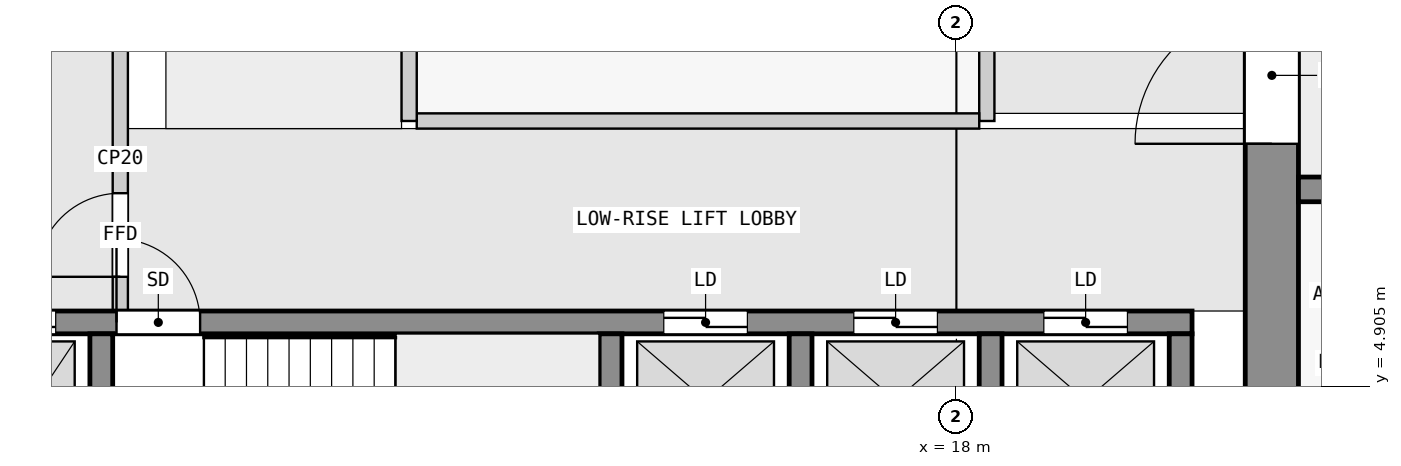
"""IFC4 building model, lengths in metres.
Left out: names, types, materials, properties, quantities, classifications, styles, units other than length and angle.
Written with IfcOpenShell. Run it as: python <this file> out.ifc"""

import sys

from ifc_helpers import new_model, si_unit, direction, frame, frame_2d, origin, place, context, subcontext, project, spatial, rectangle, extrude, element, fill, save


model = new_model("IFC4")
c1 = context("Model", 3, precision=1e-05, world=origin(), true_north=direction((0.0, 1.0)))
c2 = subcontext(c1, "Body", "Model", "MODEL_VIEW")
j1 = project(units=[si_unit("LENGTHUNIT", "METRE"), si_unit("PLANEANGLEUNIT", "RADIAN")], contexts=[c1])
p1 = place(None, origin())
s1 = spatial("IfcSite", under=j1, at=p1, CompositionType="ELEMENT")
p2 = place(p1, origin())
s2 = spatial("IfcBuilding", under=s1, at=p2, CompositionType="ELEMENT")
p3 = place(p2, frame((0.0, 0.0, 92.3)))
s3 = spatial("IfcBuildingStorey", under=s2, at=p3, CompositionType="ELEMENT", Elevation=92.3)
p4 = place(p3, frame((22.15, 2.5, 0.0), z_axis=(0.0, 0.0, 1.0), x_axis=(0.0, 1.0, 0.0)))
e1 = element("IfcWall", 1, at=p4, inside=s3, PredefinedType="SHEAR", context=c2, shape_type="SweptSolid", body=[
    extrude(rectangle(XDim=14.8, YDim=0.7, at=frame_2d((7.4, 0.0))), origin(), (0.0, 0.0, 1.0), 3.25),
])
p5 = place(p4, frame((5.6, 0.0, 0.0)))
e2 = element("IfcOpeningElement", 2, at=p5, cuts=e1, PredefinedType="OPENING", context=c2, shape_type="SweptSolid", body=[
    extrude(rectangle(XDim=1.8, YDim=2.1, at=frame_2d((0.9, 1.05))), frame((0.0, 0.36, 0.0), z_axis=(0.0, -1.0, 0.0), x_axis=(1.0, 0.0, 0.0)), (0.0, 0.0, 1.0), 0.72),
])
for number, where, z_axis, x_axis in (
    (3, (6.75, 2.8, 0.0), (0.0, 0.0, 1.0), (0.0, 1.0, 0.0)),
    (4, (13.45, 2.8, 0.0), (0.0, 0.0, 1.0), (0.0, 1.0, 0.0)),
    (5, (15.95, 2.8, 0.0), (0.0, 0.0, 1.0), (0.0, 1.0, 0.0)),
    (6, (18.45, 2.8, 0.0), (0.0, 0.0, 1.0), (0.0, 1.0, 0.0)),
    (7, (20.95, 2.8, 0.0), (0.0, 0.0, 1.0), (0.0, 1.0, 0.0)),
):
    element("IfcWall", number, at=place(p3, frame(where, z_axis=z_axis, x_axis=x_axis)), inside=s3, PredefinedType="SHEAR", context=c2, shape_type="SweptSolid", body=[
        extrude(rectangle(XDim=2.8, YDim=0.3, at=frame_2d((1.4, 0.0))), origin(), (0.0, 0.0, 1.0), 3.25),
    ])
p6 = place(p3, frame((2.3, 5.75, 0.0), z_axis=(0.0, 0.0, 1.0), x_axis=(1.0, 0.0, 0.0)))
e8 = element("IfcWall", 8, at=p6, inside=s3, PredefinedType="SHEAR", context=c2, shape_type="SweptSolid", body=[
    extrude(rectangle(XDim=18.8, YDim=0.3, at=frame_2d((9.4, 0.0))), origin(), (0.0, 0.0, 1.0), 3.25),
])
p7 = place(p6, frame((4.65, 0.0, 0.0)))
e9 = element("IfcOpeningElement", 9, at=p7, cuts=e8, PredefinedType="OPENING", context=c2, shape_type="SweptSolid", body=[
    extrude(rectangle(XDim=1.1, YDim=2.1, at=frame_2d((0.55, 1.05))), frame((0.0, 0.16, 0.0), z_axis=(0.0, -1.0, 0.0), x_axis=(1.0, 0.0, 0.0)), (0.0, 0.0, 1.0), 0.32),
])
p8 = place(p6, frame((0.45, 0.0, 0.0)))
e10 = element("IfcOpeningElement", 10, at=p8, cuts=e8, PredefinedType="OPENING", context=c2, shape_type="SweptSolid", body=[
    extrude(rectangle(XDim=1.1, YDim=2.1, at=frame_2d((0.55, 1.05))), frame((0.0, 0.16, 0.0), z_axis=(0.0, -1.0, 0.0), x_axis=(1.0, 0.0, 0.0)), (0.0, 0.0, 1.0), 0.32),
])
p9 = place(p6, frame((2.75, 0.0, 0.0)))
e11 = element("IfcOpeningElement", 11, at=p9, cuts=e8, PredefinedType="OPENING", context=c2, shape_type="SweptSolid", body=[
    extrude(rectangle(XDim=1.1, YDim=2.1, at=frame_2d((0.55, 1.05))), frame((0.0, 0.16, 0.0), z_axis=(0.0, -1.0, 0.0), x_axis=(1.0, 0.0, 0.0)), (0.0, 0.0, 1.0), 0.32),
])
p10 = place(p6, frame((11.85, 0.0, 0.0)))
e12 = element("IfcOpeningElement", 12, at=p10, cuts=e8, PredefinedType="OPENING", context=c2, shape_type="SweptSolid", body=[
    extrude(rectangle(XDim=1.1, YDim=2.1, at=frame_2d((0.55, 1.05))), frame((0.0, 0.16, 0.0), z_axis=(0.0, -1.0, 0.0), x_axis=(1.0, 0.0, 0.0)), (0.0, 0.0, 1.0), 0.32),
])
p11 = place(p6, frame((14.35, 0.0, 0.0)))
e13 = element("IfcOpeningElement", 13, at=p11, cuts=e8, PredefinedType="OPENING", context=c2, shape_type="SweptSolid", body=[
    extrude(rectangle(XDim=1.1, YDim=2.1, at=frame_2d((0.55, 1.05))), frame((0.0, 0.16, 0.0), z_axis=(0.0, -1.0, 0.0), x_axis=(1.0, 0.0, 0.0)), (0.0, 0.0, 1.0), 0.32),
])
p12 = place(p6, frame((16.85, 0.0, 0.0)))
e14 = element("IfcOpeningElement", 14, at=p12, cuts=e8, PredefinedType="OPENING", context=c2, shape_type="SweptSolid", body=[
    extrude(rectangle(XDim=1.1, YDim=2.1, at=frame_2d((0.55, 1.05))), frame((0.0, 0.16, 0.0), z_axis=(0.0, -1.0, 0.0), x_axis=(1.0, 0.0, 0.0)), (0.0, 0.0, 1.0), 0.32),
])
p13 = place(p3, frame((22.5, 7.5, 0.0), z_axis=(0.0, 0.0, 1.0), x_axis=(1.0, 0.0, 0.0)))
e15 = element("IfcWall", 15, at=p13, inside=s3, PredefinedType="SHEAR", context=c2, shape_type="SweptSolid", body=[
    extrude(rectangle(XDim=22.5, YDim=0.325, at=frame_2d((11.25, 0.0))), origin(), (0.0, 0.0, 1.0), 3.25),
])
p14 = place(p13, frame((5.65, 0.0, 0.0)))
e16 = element("IfcOpeningElement", 16, at=p14, cuts=e15, PredefinedType="OPENING", context=c2, shape_type="SweptSolid", body=[
    extrude(rectangle(XDim=1.0, YDim=2.1, at=frame_2d((0.5, 1.05))), frame((0.0, 0.172, 0.0), z_axis=(0.0, -1.0, 0.0), x_axis=(1.0, 0.0, 0.0)), (0.0, 0.0, 1.0), 0.345),
])
p15 = place(p13, frame((15.25, 0.0, 0.0)))
e17 = element("IfcOpeningElement", 17, at=p15, cuts=e15, PredefinedType="OPENING", context=c2, shape_type="SweptSolid", body=[
    extrude(rectangle(XDim=1.0, YDim=2.1, at=frame_2d((0.5, 1.05))), frame((0.0, 0.172, 0.0), z_axis=(0.0, -1.0, 0.0), x_axis=(1.0, 0.0, 0.0)), (0.0, 0.0, 1.0), 0.345),
])
p16 = place(p13, frame((18.75, 0.0, 0.0)))
e18 = element("IfcOpeningElement", 18, at=p16, cuts=e15, PredefinedType="OPENING", context=c2, shape_type="SweptSolid", body=[
    extrude(rectangle(XDim=0.9, YDim=2.1, at=frame_2d((0.45, 1.05))), frame((0.0, 0.172, 0.0), z_axis=(0.0, -1.0, 0.0), x_axis=(1.0, 0.0, 0.0)), (0.0, 0.0, 1.0), 0.345),
])
p17 = place(p13, frame((20.95, 0.0, 0.0)))
e19 = element("IfcOpeningElement", 19, at=p17, cuts=e15, PredefinedType="OPENING", context=c2, shape_type="SweptSolid", body=[
    extrude(rectangle(XDim=1.0, YDim=2.1, at=frame_2d((0.5, 1.05))), frame((0.0, 0.172, 0.0), z_axis=(0.0, -1.0, 0.0), x_axis=(1.0, 0.0, 0.0)), (0.0, 0.0, 1.0), 0.345),
])
p18 = place(p3, frame((7.0, 5.9, 0.0), z_axis=(0.0, 0.0, 1.0), x_axis=(0.0, 1.0, 0.0)))
e20 = element("IfcWall", 20, at=p18, inside=s3, PredefinedType="PARTITIONING", context=c2, shape_type="SweptSolid", body=[
    extrude(rectangle(XDim=4.0, YDim=0.2, at=frame_2d((2.0, 0.0))), origin(), (0.0, 0.0, 1.0), 3.25),
])
p19 = place(p18, frame((0.45, 0.0, 0.0)))
e21 = element("IfcOpeningElement", 21, at=p19, cuts=e20, PredefinedType="OPENING", context=c2, shape_type="SweptSolid", body=[
    extrude(rectangle(XDim=1.1, YDim=2.1, at=frame_2d((0.55, 1.05))), frame((0.0, 0.11, 0.0), z_axis=(0.0, -1.0, 0.0), x_axis=(1.0, 0.0, 0.0)), (0.0, 0.0, 1.0), 0.22),
])
p20 = place(p3, frame((10.8, 8.4, 0.0), z_axis=(0.0, 0.0, 1.0), x_axis=(0.0, 1.0, 0.0)))
e22 = element("IfcWall", 22, at=p20, inside=s3, PredefinedType="PARTITIONING", context=c2, shape_type="SweptSolid", body=[
    extrude(rectangle(XDim=6.2, YDim=0.2, at=frame_2d((3.1, 0.0))), origin(), (0.0, 0.0, 1.0), 3.25),
])
p21 = place(p3, frame((10.9, 8.4, 0.0), z_axis=(0.0, 0.0, 1.0), x_axis=(1.0, 0.0, 0.0)))
e23 = element("IfcWall", 23, at=p21, inside=s3, PredefinedType="PARTITIONING", context=c2, shape_type="SweptSolid", body=[
    extrude(rectangle(XDim=7.4, YDim=0.2, at=frame_2d((3.7, 0.0))), origin(), (0.0, 0.0, 1.0), 3.25),
])
p22 = place(p3, frame((18.4, 8.4, 0.0), z_axis=(0.0, 0.0, 1.0), x_axis=(0.0, 1.0, 0.0)))
e24 = element("IfcWall", 24, at=p22, inside=s3, PredefinedType="PARTITIONING", context=c2, shape_type="SweptSolid", body=[
    extrude(rectangle(XDim=6.2, YDim=0.2, at=frame_2d((3.1, 0.0))), origin(), (0.0, 0.0, 1.0), 3.25),
])
p23 = place(p22, frame((0.95, 0.0, 0.0)))
e25 = element("IfcOpeningElement", 25, at=p23, cuts=e24, PredefinedType="OPENING", context=c2, shape_type="SweptSolid", body=[
    extrude(rectangle(XDim=0.9, YDim=2.1, at=frame_2d((0.45, 1.05))), frame((0.0, 0.11, 0.0), z_axis=(0.0, -1.0, 0.0), x_axis=(1.0, 0.0, 0.0)), (0.0, 0.0, 1.0), 0.22),
])
p24 = place(p22, frame((4.05, 0.0, 0.0)))
e26 = element("IfcOpeningElement", 26, at=p24, cuts=e24, PredefinedType="OPENING", context=c2, shape_type="SweptSolid", body=[
    extrude(rectangle(XDim=0.9, YDim=2.1, at=frame_2d((0.45, 1.05))), frame((0.0, 0.11, 0.0), z_axis=(0.0, -1.0, 0.0), x_axis=(1.0, 0.0, 0.0)), (0.0, 0.0, 1.0), 0.22),
])
p25 = place(p19, origin())
e27 = element("IfcDoor", 27, at=p25, inside=s3, OperationType="SINGLE_SWING_LEFT", PredefinedType="DOOR", context=c2, shape_type="SweptSolid", body=[
    extrude(rectangle(XDim=1.1, YDim=2.1, at=frame_2d((0.55, 1.05))), frame((0.0, 0.025, 0.0), z_axis=(0.0, -1.0, 0.0), x_axis=(1.0, 0.0, 0.0)), (0.0, 0.0, 1.0), 0.05),
])
fill(e21, e27)
p26 = place(p7, origin())
e28 = element("IfcDoor", 28, at=p26, inside=s3, OperationType="SINGLE_SWING_LEFT", PredefinedType="DOOR", context=c2, shape_type="SweptSolid", body=[
    extrude(rectangle(XDim=1.1, YDim=2.1, at=frame_2d((0.55, 1.05))), frame((0.0, 0.025, 0.0), z_axis=(0.0, -1.0, 0.0), x_axis=(1.0, 0.0, 0.0)), (0.0, 0.0, 1.0), 0.05),
])
fill(e9, e28)
p27 = place(p9, origin())
e29 = element("IfcDoor", 29, at=p27, inside=s3, OperationType="DOUBLE_DOOR_SLIDING", PredefinedType="DOOR", context=c2, shape_type="SweptSolid", body=[
    extrude(rectangle(XDim=1.1, YDim=2.1, at=frame_2d((0.55, 1.05))), frame((0.0, 0.025, 0.0), z_axis=(0.0, -1.0, 0.0), x_axis=(1.0, 0.0, 0.0)), (0.0, 0.0, 1.0), 0.05),
])
fill(e11, e29)
p28 = place(p10, origin())
e30 = element("IfcDoor", 30, at=p28, inside=s3, OperationType="DOUBLE_DOOR_SLIDING", PredefinedType="DOOR", context=c2, shape_type="SweptSolid", body=[
    extrude(rectangle(XDim=1.1, YDim=2.1, at=frame_2d((0.55, 1.05))), frame((0.0, 0.025, 0.0), z_axis=(0.0, -1.0, 0.0), x_axis=(1.0, 0.0, 0.0)), (0.0, 0.0, 1.0), 0.05),
])
fill(e12, e30)
p29 = place(p11, origin())
e31 = element("IfcDoor", 31, at=p29, inside=s3, OperationType="DOUBLE_DOOR_SLIDING", PredefinedType="DOOR", context=c2, shape_type="SweptSolid", body=[
    extrude(rectangle(XDim=1.1, YDim=2.1, at=frame_2d((0.55, 1.05))), frame((0.0, 0.025, 0.0), z_axis=(0.0, -1.0, 0.0), x_axis=(1.0, 0.0, 0.0)), (0.0, 0.0, 1.0), 0.05),
])
fill(e13, e31)
p30 = place(p12, origin())
e32 = element("IfcDoor", 32, at=p30, inside=s3, OperationType="DOUBLE_DOOR_SLIDING", PredefinedType="DOOR", context=c2, shape_type="SweptSolid", body=[
    extrude(rectangle(XDim=1.1, YDim=2.1, at=frame_2d((0.55, 1.05))), frame((0.0, 0.025, 0.0), z_axis=(0.0, -1.0, 0.0), x_axis=(1.0, 0.0, 0.0)), (0.0, 0.0, 1.0), 0.05),
])
fill(e14, e32)
p31 = place(p5, origin())
e33 = element("IfcDoor", 33, at=p31, inside=s3, OperationType="DOUBLE_DOOR_SINGLE_SWING", PredefinedType="DOOR", context=c2, shape_type="SweptSolid", body=[
    extrude(rectangle(XDim=1.8, YDim=2.1, at=frame_2d((0.9, 1.05))), frame((0.0, 0.025, 0.0), z_axis=(0.0, -1.0, 0.0), x_axis=(1.0, 0.0, 0.0)), (0.0, 0.0, 1.0), 0.05),
])
fill(e2, e33)
save(model, sys.argv[1])
